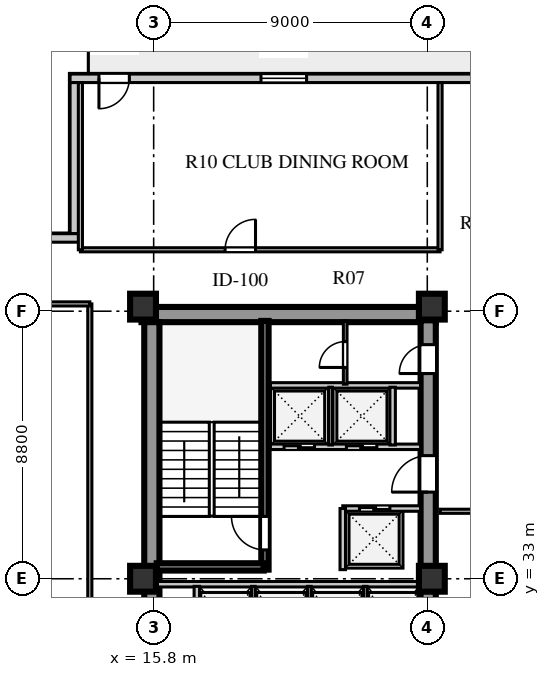
"""IFC4 building model, lengths in metres.
Left out: names, types, materials, properties, quantities, classifications, styles, units other than length and angle.
Written with IfcOpenShell. Run it as: python <this file> out.ifc"""

import sys

from ifc_helpers import new_model, si_unit, direction, frame, frame_2d, origin, origin_2d, place, context, subcontext, project, spatial, rectangle, extrude, element, fill, save


model = new_model("IFC4")
c1 = context("Model", 3, precision=1e-05, world=origin(), true_north=direction((0.0, 1.0)))
c2 = subcontext(c1, "Body", "Model", "MODEL_VIEW")
j1 = project(units=[si_unit("LENGTHUNIT", "METRE"), si_unit("PLANEANGLEUNIT", "RADIAN")], contexts=[c1])
p1 = place(None, origin())
s1 = spatial("IfcSite", under=j1, at=p1, CompositionType="ELEMENT")
p2 = place(p1, origin())
s2 = spatial("IfcBuilding", under=s1, at=p2, CompositionType="ELEMENT")
p3 = place(p2, frame((0.0, 0.0, 188.7)))
s3 = spatial("IfcBuildingStorey", under=s2, at=p3, CompositionType="ELEMENT", Elevation=188.7)
p4 = place(p3, frame((15.4, 41.69, 0.0), z_axis=(0.0, 0.0, 1.0), x_axis=(1.0, 0.0, 0.0)))
e1 = element("IfcWall", 1, at=p4, inside=s3, PredefinedType="SHEAR", context=c2, shape_type="SweptSolid", body=[
    extrude(rectangle(XDim=9.68, YDim=0.5, at=frame_2d((4.84, 0.0))), origin(), (0.0, 0.0, 1.0), 3.6),
])
p5 = place(p3, frame((15.74, 15.81, 0.0), z_axis=(0.0, 0.0, 1.0), x_axis=(0.0, 1.0, 0.0)))
e2 = element("IfcWall", 2, at=p5, inside=s3, PredefinedType="SHEAR", context=c2, shape_type="SweptSolid", body=[
    extrude(rectangle(XDim=25.63, YDim=0.5, at=frame_2d((12.815, 0.0))), origin(), (0.0, 0.0, 1.0), 3.6),
])
p6 = place(p3, frame((24.83, 15.74, 0.0), z_axis=(0.0, 0.0, 1.0), x_axis=(0.0, 1.0, 0.0)))
e3 = element("IfcWall", 3, at=p6, inside=s3, PredefinedType="SHEAR", context=c2, shape_type="SweptSolid", body=[
    extrude(rectangle(XDim=25.76, YDim=0.5, at=frame_2d((12.88, 0.0))), origin(), (0.0, 0.0, 1.0), 3.6),
])
p7 = place(p6, frame((1.61, 0.0, 0.0)))
e4 = element("IfcOpeningElement", 4, at=p7, cuts=e3, PredefinedType="OPENING", context=c2, shape_type="SweptSolid", body=[
    extrude(rectangle(XDim=1.2, YDim=2.1, at=frame_2d((0.6, 1.05))), frame((0.0, 0.26, 0.0), z_axis=(0.0, -1.0, 0.0), x_axis=(1.0, 0.0, 0.0)), (0.0, 0.0, 1.0), 0.52),
])
p8 = place(p6, frame((6.78, 0.0, 0.0)))
e5 = element("IfcOpeningElement", 5, at=p8, cuts=e3, PredefinedType="OPENING", context=c2, shape_type="SweptSolid", body=[
    extrude(rectangle(XDim=0.85, YDim=2.06, at=frame_2d((0.425, 1.03))), frame((0.0, 0.26, 0.0), z_axis=(0.0, -1.0, 0.0), x_axis=(1.0, 0.0, 0.0)), (0.0, 0.0, 1.0), 0.52),
])
p9 = place(p6, frame((12.11, 0.0, 0.0)))
e6 = element("IfcOpeningElement", 6, at=p9, cuts=e3, PredefinedType="OPENING", context=c2, shape_type="SweptSolid", body=[
    extrude(rectangle(XDim=1.5, YDim=2.12, at=frame_2d((0.75, 1.06))), frame((0.0, 0.26, 0.0), z_axis=(0.0, -1.0, 0.0), x_axis=(1.0, 0.0, 0.0)), (0.0, 0.0, 1.0), 0.52),
])
p10 = place(p6, frame((20.11, 0.0, 0.0)))
e7 = element("IfcOpeningElement", 7, at=p10, cuts=e3, PredefinedType="OPENING", context=c2, shape_type="SweptSolid", body=[
    extrude(rectangle(XDim=1.2, YDim=2.12, at=frame_2d((0.6, 1.06))), frame((0.0, 0.26, 0.0), z_axis=(0.0, -1.0, 0.0), x_axis=(1.0, 0.0, 0.0)), (0.0, 0.0, 1.0), 0.52),
])
p11 = place(p6, frame((24.01, 0.0, 0.0)))
e8 = element("IfcOpeningElement", 8, at=p11, cuts=e3, PredefinedType="OPENING", context=c2, shape_type="SweptSolid", body=[
    extrude(rectangle(XDim=0.95, YDim=2.1, at=frame_2d((0.475, 1.05))), frame((0.0, 0.26, 0.0), z_axis=(0.0, -1.0, 0.0), x_axis=(1.0, 0.0, 0.0)), (0.0, 0.0, 1.0), 0.52),
])
for number, where, z_axis, x_axis in (
    (9, (15.45, 33.0, 0.0), (0.0, 0.0, 1.0), (1.0, 0.0, 0.0)),
    (10, (15.45, 41.95, 0.0), (0.0, 0.0, 1.0), (1.0, 0.0, 0.0)),
    (11, (24.95, 33.0, 0.0), (0.0, 0.0, 1.0), (1.0, 0.0, 0.0)),
    (12, (24.95, 41.95, 0.0), (0.0, 0.0, 1.0), (1.0, 0.0, 0.0)),
):
    element("IfcColumn", number, at=place(p3, frame(where, z_axis=z_axis, x_axis=x_axis)), inside=s3, PredefinedType="COLUMN", context=c2, shape_type="SweptSolid", body=[
        extrude(rectangle(XDim=0.85, YDim=0.85, at=origin_2d()), origin(), (0.0, 0.0, 1.0), 3.6),
    ])
p12 = place(p3, frame((45.55, 49.46, 0.0), z_axis=(0.0, 0.0, 1.0), x_axis=(-1.0, 0.0, 0.0)))
e13 = element("IfcWall", 13, at=p12, inside=s3, PredefinedType="STANDARD", context=c2, shape_type="SweptSolid", body=[
    extrude(rectangle(XDim=32.5, YDim=0.28, at=frame_2d((16.25, 0.0))), origin(), (0.0, 0.0, 1.0), 3.6),
])
p13 = place(p12, frame((30.55, 0.0, 0.0)))
e14 = element("IfcOpeningElement", 14, at=p13, cuts=e13, PredefinedType="OPENING", context=c2, shape_type="SweptSolid", body=[
    extrude(rectangle(XDim=1.0, YDim=2.05, at=frame_2d((0.5, 1.025))), frame((0.0, 0.15, 0.0), z_axis=(0.0, -1.0, 0.0), x_axis=(1.0, 0.0, 0.0)), (0.0, 0.0, 1.0), 0.3),
])
p14 = place(p12, frame((24.72, 0.0, 0.8)))
e15 = element("IfcOpeningElement", 15, at=p14, cuts=e13, PredefinedType="OPENING", context=c2, shape_type="SweptSolid", body=[
    extrude(rectangle(XDim=1.5, YDim=2.0, at=frame_2d((0.75, 1.0))), frame((0.0, 0.15, 0.0), z_axis=(0.0, -1.0, 0.0), x_axis=(1.0, 0.0, 0.0)), (0.0, 0.0, 1.0), 0.3),
])
p15 = place(p12, frame((16.045, 0.0, 0.8)))
e16 = element("IfcOpeningElement", 16, at=p15, cuts=e13, PredefinedType="OPENING", context=c2, shape_type="SweptSolid", body=[
    extrude(rectangle(XDim=1.2, YDim=1.75, at=frame_2d((0.6, 0.875))), frame((0.0, 0.15, 0.0), z_axis=(0.0, -1.0, 0.0), x_axis=(1.0, 0.0, 0.0)), (0.0, 0.0, 1.0), 0.3),
])
p16 = place(p12, frame((11.295, 0.0, 0.8)))
e17 = element("IfcOpeningElement", 17, at=p16, cuts=e13, PredefinedType="OPENING", context=c2, shape_type="SweptSolid", body=[
    extrude(rectangle(XDim=1.2, YDim=1.75, at=frame_2d((0.6, 0.875))), frame((0.0, 0.15, 0.0), z_axis=(0.0, -1.0, 0.0), x_axis=(1.0, 0.0, 0.0)), (0.0, 0.0, 1.0), 0.3),
])
p17 = place(p12, frame((6.73, 0.0, 0.8)))
e18 = element("IfcOpeningElement", 18, at=p17, cuts=e13, PredefinedType="OPENING", context=c2, shape_type="SweptSolid", body=[
    extrude(rectangle(XDim=2.1, YDim=1.95, at=frame_2d((1.05, 0.975))), frame((0.0, 0.15, 0.0), z_axis=(0.0, -1.0, 0.0), x_axis=(1.0, 0.0, 0.0)), (0.0, 0.0, 1.0), 0.3),
])
p18 = place(p12, frame((1.745, 0.0, 0.8)))
e19 = element("IfcOpeningElement", 19, at=p18, cuts=e13, PredefinedType="OPENING", context=c2, shape_type="SweptSolid", body=[
    extrude(rectangle(XDim=1.35, YDim=1.9, at=frame_2d((0.675, 0.95))), frame((0.0, 0.15, 0.0), z_axis=(0.0, -1.0, 0.0), x_axis=(1.0, 0.0, 0.0)), (0.0, 0.0, 1.0), 0.3),
])
p19 = place(p3, frame((13.19, 49.32, 0.0), z_axis=(0.0, 0.0, 1.0), x_axis=(0.0, -1.0, 0.0)))
e20 = element("IfcWall", 20, at=p19, inside=s3, PredefinedType="STANDARD", context=c2, shape_type="SweptSolid", body=[
    extrude(rectangle(XDim=4.97, YDim=0.28, at=frame_2d((2.485, 0.0))), origin(), (0.0, 0.0, 1.0), 3.6),
])
p20 = place(p3, frame((13.33, 44.21, 0.0), z_axis=(0.0, 0.0, 1.0), x_axis=(-1.0, 0.0, 0.0)))
e21 = element("IfcWall", 21, at=p20, inside=s3, PredefinedType="STANDARD", context=c2, shape_type="SweptSolid", body=[
    extrude(rectangle(XDim=5.53, YDim=0.28, at=frame_2d((2.765, 0.0))), origin(), (0.0, 0.0, 1.0), 3.6),
])
p21 = place(p3, frame((15.9, 32.82, 0.0), z_axis=(0.0, 0.0, 1.0), x_axis=(1.0, 0.0, 0.0)))
e22 = element("IfcWall", 22, at=p21, inside=s3, PredefinedType="SOLIDWALL", context=c2, shape_type="SweptSolid", body=[
    extrude(rectangle(XDim=8.68, YDim=0.18, at=frame_2d((4.34, 0.0))), origin(), (0.0, 0.0, 1.0), 2.95),
])
p22 = place(p3, frame((17.22, 30.7, 0.0), z_axis=(0.0, 0.0, 1.0), x_axis=(0.0, 1.0, 0.0)))
e23 = element("IfcWall", 23, at=p22, inside=s3, PredefinedType="SOLIDWALL", context=c2, shape_type="SweptSolid", body=[
    extrude(rectangle(XDim=2.05, YDim=0.18, at=frame_2d((1.025, 0.0))), origin(), (0.0, 0.0, 1.0), 3.6),
])
for number, where, z_axis, x_axis in (
    (24, (19.08, 30.7, 0.0), (0.0, 0.0, 1.0), (0.0, 1.0, 0.0)),
    (25, (20.92, 30.7, 0.0), (0.0, 0.0, 1.0), (0.0, 1.0, 0.0)),
    (26, (22.76, 30.7, 0.0), (0.0, 0.0, 1.0), (0.0, 1.0, 0.0)),
):
    element("IfcWall", number, at=place(p3, frame(where, z_axis=z_axis, x_axis=x_axis)), inside=s3, PredefinedType="PARTITIONING", context=c2, shape_type="SweptSolid", body=[
        extrude(rectangle(XDim=2.05, YDim=0.12, at=frame_2d((1.025, 0.0))), origin(), (0.0, 0.0, 1.0), 3.6),
    ])
p23 = place(p3, frame((19.46, 33.3, 0.0), z_axis=(0.0, 0.0, 1.0), x_axis=(0.0, 1.0, 0.0)))
e27 = element("IfcWall", 27, at=p23, inside=s3, PredefinedType="SHEAR", context=c2, shape_type="SweptSolid", body=[
    extrude(rectangle(XDim=8.18, YDim=0.24, at=frame_2d((4.09, 0.0))), origin(), (0.0, 0.0, 1.0), 3.85),
])
p24 = place(p23, frame((0.65, 0.0, 0.0)))
e28 = element("IfcOpeningElement", 28, at=p24, cuts=e27, PredefinedType="OPENING", context=c2, shape_type="SweptSolid", body=[
    extrude(rectangle(XDim=1.1, YDim=2.1, at=frame_2d((0.55, 1.05))), frame((0.0, 0.13, 0.0), z_axis=(0.0, -1.0, 0.0), x_axis=(1.0, 0.0, 0.0)), (0.0, 0.0, 1.0), 0.26),
])
p25 = place(p3, frame((15.9, 33.39, 0.0), z_axis=(0.0, 0.0, 1.0), x_axis=(1.0, 0.0, 0.0)))
e29 = element("IfcWall", 29, at=p25, inside=s3, PredefinedType="SHEAR", context=c2, shape_type="SweptSolid", body=[
    extrude(rectangle(XDim=3.52, YDim=0.24, at=frame_2d((1.76, 0.0))), origin(), (0.0, 0.0, 1.0), 3.85),
])
p26 = place(p3, frame((22.02, 35.31, 0.0), z_axis=(0.0, 0.0, 1.0), x_axis=(1.0, 0.0, 0.0)))
e30 = element("IfcWall", 30, at=p26, inside=s3, PredefinedType="SOLIDWALL", context=c2, shape_type="SweptSolid", body=[
    extrude(rectangle(XDim=2.56, YDim=0.18, at=frame_2d((1.28, 0.0))), origin(), (0.0, 0.0, 1.0), 3.6),
])
p27 = place(p26, frame((0.55, 0.0, 0.0)))
e31 = element("IfcOpeningElement", 31, at=p27, cuts=e30, PredefinedType="OPENING", context=c2, shape_type="SweptSolid", body=[
    extrude(rectangle(XDim=1.0, YDim=2.1, at=frame_2d((0.5, 1.05))), frame((0.0, 0.1, 0.0), z_axis=(0.0, -1.0, 0.0), x_axis=(1.0, 0.0, 0.0)), (0.0, 0.0, 1.0), 0.2),
])
p28 = place(p3, frame((22.02, 33.3, 0.0), z_axis=(0.0, 0.0, 1.0), x_axis=(0.0, 1.0, 0.0)))
e32 = element("IfcWall", 32, at=p28, inside=s3, PredefinedType="SOLIDWALL", context=c2, shape_type="SweptSolid", body=[
    extrude(rectangle(XDim=2.01, YDim=0.18, at=frame_2d((1.005, 0.0))), origin(), (0.0, 0.0, 1.0), 3.6),
])
p29 = place(p3, frame((19.64, 37.34, 0.0), z_axis=(0.0, 0.0, 1.0), x_axis=(1.0, 0.0, 0.0)))
e33 = element("IfcWall", 33, at=p29, inside=s3, PredefinedType="SOLIDWALL", context=c2, shape_type="SweptSolid", body=[
    extrude(rectangle(XDim=4.94, YDim=0.18, at=frame_2d((2.47, 0.0))), origin(), (0.0, 0.0, 1.0), 3.6),
])
p30 = place(p29, frame((0.45, 0.0, 0.0)))
e34 = element("IfcOpeningElement", 34, at=p30, cuts=e33, PredefinedType="OPENING", context=c2, shape_type="SweptSolid", body=[
    extrude(rectangle(XDim=1.0, YDim=2.1, at=frame_2d((0.5, 1.05))), frame((0.0, 0.1, 0.0), z_axis=(0.0, -1.0, 0.0), x_axis=(1.0, 0.0, 0.0)), (0.0, 0.0, 1.0), 0.2),
])
p31 = place(p29, frame((2.5, 0.0, 0.0)))
e35 = element("IfcOpeningElement", 35, at=p31, cuts=e33, PredefinedType="OPENING", context=c2, shape_type="SweptSolid", body=[
    extrude(rectangle(XDim=1.0, YDim=2.1, at=frame_2d((0.5, 1.05))), frame((0.0, 0.1, 0.0), z_axis=(0.0, -1.0, 0.0), x_axis=(1.0, 0.0, 0.0)), (0.0, 0.0, 1.0), 0.2),
])
p32 = place(p3, frame((19.64, 39.36, 0.0), z_axis=(0.0, 0.0, 1.0), x_axis=(1.0, 0.0, 0.0)))
e36 = element("IfcWall", 36, at=p32, inside=s3, PredefinedType="SOLIDWALL", context=c2, shape_type="SweptSolid", body=[
    extrude(rectangle(XDim=4.94, YDim=0.18, at=frame_2d((2.47, 0.0))), origin(), (0.0, 0.0, 1.0), 3.6),
])
p33 = place(p3, frame((21.62, 37.4, 0.0), z_axis=(0.0, 0.0, 1.0), x_axis=(0.0, 1.0, 0.0)))
e37 = element("IfcWall", 37, at=p33, inside=s3, PredefinedType="PARTITIONING", context=c2, shape_type="SweptSolid", body=[
    extrude(rectangle(XDim=1.9, YDim=0.12, at=frame_2d((0.95, 0.0))), origin(), (0.0, 0.0, 1.0), 3.6),
])
p34 = place(p3, frame((23.66, 37.4, 0.0), z_axis=(0.0, 0.0, 1.0), x_axis=(0.0, 1.0, 0.0)))
e38 = element("IfcWall", 38, at=p34, inside=s3, PredefinedType="SOLIDWALL", context=c2, shape_type="SweptSolid", body=[
    extrude(rectangle(XDim=1.9, YDim=0.18, at=frame_2d((0.95, 0.0))), origin(), (0.0, 0.0, 1.0), 3.6),
])
p35 = place(p3, frame((22.1, 39.4, 0.0), z_axis=(0.0, 0.0, 1.0), x_axis=(0.0, 1.0, 0.0)))
e39 = element("IfcWall", 39, at=p35, inside=s3, PredefinedType="PARTITIONING", context=c2, shape_type="SweptSolid", body=[
    extrude(rectangle(XDim=2.08, YDim=0.12, at=frame_2d((1.04, 0.0))), origin(), (0.0, 0.0, 1.0), 3.6),
])
p36 = place(p35, frame((0.55, 0.0, 0.0)))
e40 = element("IfcOpeningElement", 40, at=p36, cuts=e39, PredefinedType="OPENING", context=c2, shape_type="SweptSolid", body=[
    extrude(rectangle(XDim=0.85, YDim=2.06, at=frame_2d((0.425, 1.03))), frame((0.0, 0.07, 0.0), z_axis=(0.0, -1.0, 0.0), x_axis=(1.0, 0.0, 0.0)), (0.0, 0.0, 1.0), 0.14),
])
p37 = place(p3, frame((25.22, 35.22, 0.0), z_axis=(0.0, 0.0, 1.0), x_axis=(1.0, 0.0, 0.0)))
e41 = element("IfcWall", 41, at=p37, inside=s3, PredefinedType="PARTITIONING", context=c2, shape_type="SweptSolid", body=[
    extrude(rectangle(XDim=9.5, YDim=0.135, at=frame_2d((4.75, 0.0))), origin(), (0.0, 0.0, 1.0), 3.6),
])
p38 = place(p37, frame((1.2, 0.0, 0.0)))
e42 = element("IfcOpeningElement", 42, at=p38, cuts=e41, PredefinedType="OPENING", context=c2, shape_type="SweptSolid", body=[
    extrude(rectangle(XDim=0.95, YDim=2.1, at=frame_2d((0.475, 1.05))), frame((0.0, 0.078, 0.0), z_axis=(0.0, -1.0, 0.0), x_axis=(1.0, 0.0, 0.0)), (0.0, 0.0, 1.0), 0.155),
])
p39 = place(p3, frame((13.7, 15.16, 0.0), z_axis=(0.0, 0.0, 1.0), x_axis=(0.0, 1.0, 0.0)))
e43 = element("IfcWall", 43, at=p39, inside=s3, PredefinedType="PARTITIONING", context=c2, shape_type="SweptSolid", body=[
    extrude(rectangle(XDim=26.88, YDim=0.135, at=frame_2d((13.44, 0.0))), origin(), (0.0, 0.0, 1.0), 3.6),
])
p40 = place(p39, frame((0.91, 0.0, 0.0)))
e44 = element("IfcOpeningElement", 44, at=p40, cuts=e43, PredefinedType="OPENING", context=c2, shape_type="SweptSolid", body=[
    extrude(rectangle(XDim=0.95, YDim=2.1, at=frame_2d((0.475, 1.05))), frame((0.0, 0.078, 0.0), z_axis=(0.0, -1.0, 0.0), x_axis=(1.0, 0.0, 0.0)), (0.0, 0.0, 1.0), 0.155),
])
p41 = place(p3, frame((8.08, 42.04, 0.0), z_axis=(0.0, 0.0, 1.0), x_axis=(1.0, 0.0, 0.0)))
e45 = element("IfcWall", 45, at=p41, inside=s3, PredefinedType="PARTITIONING", context=c2, shape_type="SweptSolid", body=[
    extrude(rectangle(XDim=5.62, YDim=0.135, at=frame_2d((2.81, 0.0))), origin(), (0.0, 0.0, 1.0), 3.15),
])
p42 = place(p3, frame((13.39, 43.82, 0.0), z_axis=(0.0, 0.0, 1.0), x_axis=(1.0, 0.0, 0.0)))
e46 = element("IfcWall", 46, at=p42, inside=s3, PredefinedType="PARTITIONING", context=c2, shape_type="SweptSolid", body=[
    extrude(rectangle(XDim=11.83, YDim=0.135, at=frame_2d((5.915, 0.0))), origin(), (0.0, 0.0, 1.0), 3.6),
])
p43 = place(p42, frame((4.76, 0.0, 0.0)))
e47 = element("IfcOpeningElement", 47, at=p43, cuts=e46, PredefinedType="OPENING", context=c2, shape_type="SweptSolid", body=[
    extrude(rectangle(XDim=1.0, YDim=2.08, at=frame_2d((0.5, 1.04))), frame((0.0, 0.078, 0.0), z_axis=(0.0, -1.0, 0.0), x_axis=(1.0, 0.0, 0.0)), (0.0, 0.0, 1.0), 0.155),
])
p44 = place(p3, frame((13.39, 43.82, 0.0), z_axis=(0.0, 0.0, 1.0), x_axis=(0.0, 1.0, 0.0)))
e48 = element("IfcWall", 48, at=p44, inside=s3, PredefinedType="PARTITIONING", context=c2, shape_type="SweptSolid", body=[
    extrude(rectangle(XDim=5.5, YDim=0.135, at=frame_2d((2.75, 0.0))), origin(), (0.0, 0.0, 1.0), 3.6),
])
p45 = place(p3, frame((25.22, 43.82, 0.0), z_axis=(0.0, 0.0, 1.0), x_axis=(0.0, 1.0, 0.0)))
e49 = element("IfcWall", 49, at=p45, inside=s3, PredefinedType="PARTITIONING", context=c2, shape_type="SweptSolid", body=[
    extrude(rectangle(XDim=5.5, YDim=0.135, at=frame_2d((2.75, 0.0))), origin(), (0.0, 0.0, 1.0), 3.15),
])
p46 = place(p13, frame((1.0, 0.0, 0.0), z_axis=(0.0, 0.0, 1.0), x_axis=(-1.0, 0.0, 0.0)))
e50 = element("IfcDoor", 50, at=p46, inside=s3, OperationType="SINGLE_SWING_LEFT", PredefinedType="DOOR", context=c2, shape_type="SweptSolid", body=[
    extrude(rectangle(XDim=1.0, YDim=2.05, at=frame_2d((0.5, 1.025))), frame((0.0, 0.025, 0.0), z_axis=(0.0, -1.0, 0.0), x_axis=(1.0, 0.0, 0.0)), (0.0, 0.0, 1.0), 0.05),
])
fill(e14, e50)
p47 = place(p14, origin())
e51 = element("IfcWindow", 51, at=p47, inside=s3, PartitioningType="SINGLE_PANEL", PredefinedType="WINDOW", context=c2, shape_type="SweptSolid", body=[
    extrude(rectangle(XDim=1.5, YDim=2.0, at=frame_2d((0.75, 1.0))), frame((0.0, 0.03, 0.0), z_axis=(0.0, -1.0, 0.0), x_axis=(1.0, 0.0, 0.0)), (0.0, 0.0, 1.0), 0.06),
])
fill(e15, e51)
p48 = place(p24, origin())
e52 = element("IfcDoor", 52, at=p48, inside=s3, OperationType="SINGLE_SWING_RIGHT", PredefinedType="DOOR", context=c2, shape_type="SweptSolid", body=[
    extrude(rectangle(XDim=1.1, YDim=2.1, at=frame_2d((0.55, 1.05))), frame((0.0, 0.025, 0.0), z_axis=(0.0, -1.0, 0.0), x_axis=(1.0, 0.0, 0.0)), (0.0, 0.0, 1.0), 0.05),
])
fill(e28, e52)
p49 = place(p10, frame((1.2, 0.0, 0.0), z_axis=(0.0, 0.0, 1.0), x_axis=(-1.0, 0.0, 0.0)))
e53 = element("IfcDoor", 53, at=p49, inside=s3, OperationType="SINGLE_SWING_RIGHT", PredefinedType="DOOR", context=c2, shape_type="SweptSolid", body=[
    extrude(rectangle(XDim=1.2, YDim=2.12, at=frame_2d((0.6, 1.06))), frame((0.0, 0.025, 0.0), z_axis=(0.0, -1.0, 0.0), x_axis=(1.0, 0.0, 0.0)), (0.0, 0.0, 1.0), 0.05),
])
fill(e7, e53)
p50 = place(p30, frame((1.0, 0.0, 0.0), z_axis=(0.0, 0.0, 1.0), x_axis=(-1.0, 0.0, 0.0)))
e54 = element("IfcDoor", 54, at=p50, inside=s3, OperationType="DOUBLE_DOOR_SLIDING", PredefinedType="DOOR", context=c2, shape_type="SweptSolid", body=[
    extrude(rectangle(XDim=1.0, YDim=2.1, at=frame_2d((0.5, 1.05))), frame((0.0, 0.025, 0.0), z_axis=(0.0, -1.0, 0.0), x_axis=(1.0, 0.0, 0.0)), (0.0, 0.0, 1.0), 0.05),
])
fill(e34, e54)
p51 = place(p31, frame((1.0, 0.0, 0.0), z_axis=(0.0, 0.0, 1.0), x_axis=(-1.0, 0.0, 0.0)))
e55 = element("IfcDoor", 55, at=p51, inside=s3, OperationType="DOUBLE_DOOR_SLIDING", PredefinedType="DOOR", context=c2, shape_type="SweptSolid", body=[
    extrude(rectangle(XDim=1.0, YDim=2.1, at=frame_2d((0.5, 1.05))), frame((0.0, 0.025, 0.0), z_axis=(0.0, -1.0, 0.0), x_axis=(1.0, 0.0, 0.0)), (0.0, 0.0, 1.0), 0.05),
])
fill(e35, e55)
p52 = place(p27, origin())
e56 = element("IfcDoor", 56, at=p52, inside=s3, OperationType="DOUBLE_DOOR_SLIDING", PredefinedType="DOOR", context=c2, shape_type="SweptSolid", body=[
    extrude(rectangle(XDim=1.0, YDim=2.1, at=frame_2d((0.5, 1.05))), frame((0.0, 0.025, 0.0), z_axis=(0.0, -1.0, 0.0), x_axis=(1.0, 0.0, 0.0)), (0.0, 0.0, 1.0), 0.05),
])
fill(e31, e56)
p53 = place(p36, origin())
e57 = element("IfcDoor", 57, at=p53, inside=s3, OperationType="SINGLE_SWING_LEFT", PredefinedType="DOOR", context=c2, shape_type="SweptSolid", body=[
    extrude(rectangle(XDim=0.85, YDim=2.06, at=frame_2d((0.425, 1.03))), frame((0.0, 0.025, 0.0), z_axis=(0.0, -1.0, 0.0), x_axis=(1.0, 0.0, 0.0)), (0.0, 0.0, 1.0), 0.05),
])
fill(e40, e57)
p54 = place(p11, frame((0.95, 0.0, 0.0), z_axis=(0.0, 0.0, 1.0), x_axis=(-1.0, 0.0, 0.0)))
e58 = element("IfcDoor", 58, at=p54, inside=s3, OperationType="SINGLE_SWING_RIGHT", PredefinedType="DOOR", context=c2, shape_type="SweptSolid", body=[
    extrude(rectangle(XDim=0.95, YDim=2.1, at=frame_2d((0.475, 1.05))), frame((0.0, 0.025, 0.0), z_axis=(0.0, -1.0, 0.0), x_axis=(1.0, 0.0, 0.0)), (0.0, 0.0, 1.0), 0.05),
])
fill(e8, e58)
p55 = place(p43, origin())
e59 = element("IfcDoor", 59, at=p55, inside=s3, OperationType="SINGLE_SWING_RIGHT", PredefinedType="DOOR", context=c2, shape_type="SweptSolid", body=[
    extrude(rectangle(XDim=1.0, YDim=2.08, at=frame_2d((0.5, 1.04))), frame((0.0, 0.025, 0.0), z_axis=(0.0, -1.0, 0.0), x_axis=(1.0, 0.0, 0.0)), (0.0, 0.0, 1.0), 0.05),
])
fill(e47, e59)
save(model, sys.argv[1])
